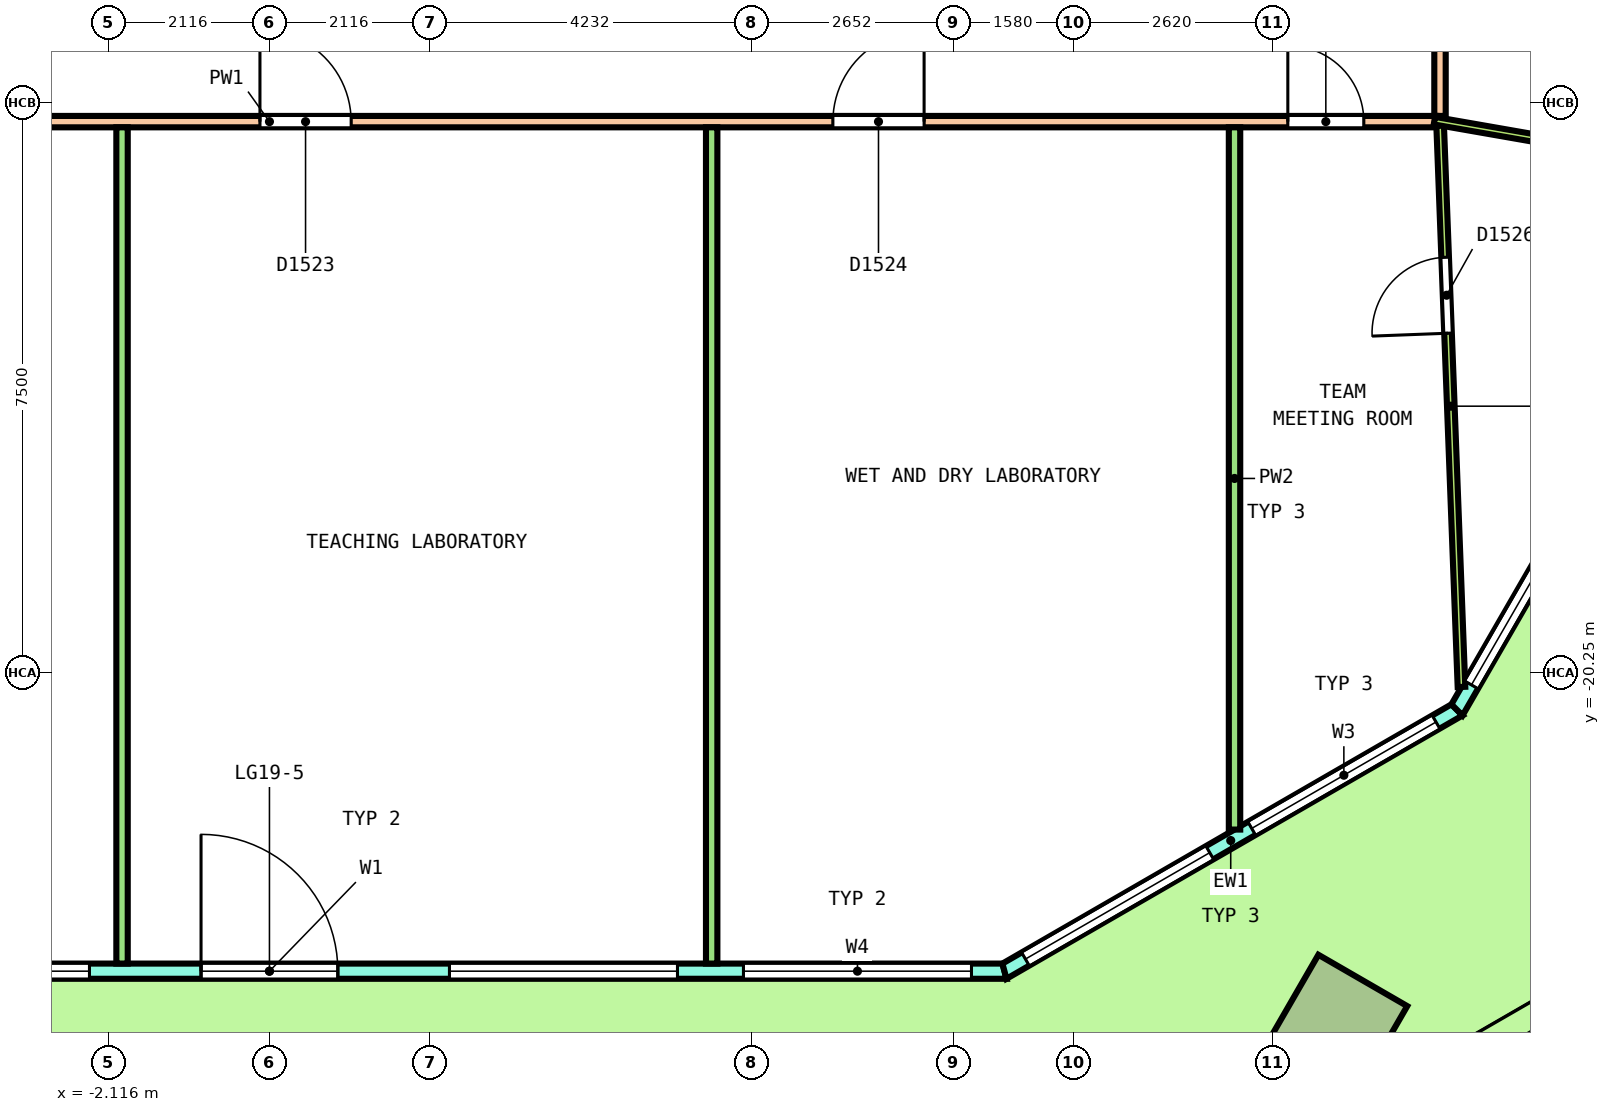
"""IFC4 building model, lengths in metres.
Left out: names, types, materials, properties, quantities, classifications, styles, units other than length and angle.
Written with IfcOpenShell. Run it as: python <this file> out.ifc"""

import sys

from ifc_helpers import new_model, si_unit, direction, frame, frame_2d, origin, origin_2d, place, context, subcontext, project, spatial, polyline, rectangle, outline, extrude, element, fill, save


model = new_model("IFC4")
c1 = context("Model", 3, precision=1e-05, world=origin(), true_north=direction((0.0, 1.0)))
c2 = subcontext(c1, "Body", "Model", "MODEL_VIEW")
j1 = project(units=[si_unit("LENGTHUNIT", "METRE"), si_unit("PLANEANGLEUNIT", "RADIAN")], contexts=[c1])
p1 = place(None, origin())
s1 = spatial("IfcSite", under=j1, at=p1, CompositionType="ELEMENT")
p2 = place(p1, origin())
s2 = spatial("IfcBuilding", under=s1, at=p2, CompositionType="ELEMENT")
p3 = place(p2, frame((0.0, 0.0, 89.6)))
s3 = spatial("IfcBuildingStorey", under=s2, at=p3, CompositionType="ELEMENT", Elevation=89.6)
p4 = place(p3, frame((14.047, -24.883, 0.0), z_axis=(-0.018133721723, -0.031387604711, 0.999342777233), x_axis=(0.86599921333, 0.499059227482, 0.031388691869)))
e1 = element("IfcColumn", 1, at=p4, inside=s3, PredefinedType="COLUMN", context=c2, shape_type="SweptSolid", body=[
    extrude(rectangle(XDim=1.35, YDim=1.35, at=origin_2d()), origin(), (0.0, 0.0, 1.0), 4.052),
])
p5 = place(p3, frame((-9.67, -24.177, 0.0), z_axis=(0.0, 0.0, 1.0), x_axis=(1.0, 0.0, 0.0)))
e2 = element("IfcWall", 2, at=p5, inside=s3, PredefinedType="SOLIDWALL", context=c2, shape_type="SweptSolid", body=[
    extrude(outline(polyline([(-0.027, -0.1), (0.994, -0.1), (2.015, -0.1), (3.035, -0.1), (4.056, -0.1), (5.077, -0.1), (6.097, -0.1), (7.118, -0.1), (8.139, -0.1), (9.16, -0.1), (10.18, -0.1), (11.201, -0.1), (12.222, -0.1), (13.242, -0.1), (14.263, -0.1), (15.284, -0.1), (16.304, -0.1), (17.325, -0.1), (18.346, -0.1), (19.367, -0.1), (19.313, 0.1), (18.298, 0.1), (17.283, 0.1), (16.268, 0.1), (15.253, 0.1), (14.238, 0.1), (13.223, 0.1), (12.208, 0.1), (11.193, 0.1), (10.177, 0.1), (9.162, 0.1), (8.147, 0.1), (7.132, 0.1), (6.117, 0.1), (5.102, 0.1), (4.087, 0.1), (3.072, 0.1), (2.057, 0.1), (1.042, 0.1), (0.027, 0.1), (-0.027, -0.1)])), origin(), (0.0, 0.0, 1.0), 4.1),
])
p6 = place(p5, frame((0.434, 0.0, 0.1)))
e3 = element("IfcOpeningElement", 3, at=p6, cuts=e2, PredefinedType="OPENING", context=c2, shape_type="SweptSolid", body=[
    extrude(rectangle(XDim=3.0, YDim=2.9, at=frame_2d((1.5, 1.45))), frame((0.0, 0.11, 0.0), z_axis=(0.0, -1.0, 0.0), x_axis=(1.0, 0.0, 0.0)), (0.0, 0.0, 1.0), 0.22),
])
p7 = place(p5, frame((4.302, 0.0, 0.1)))
e4 = element("IfcOpeningElement", 4, at=p7, cuts=e2, PredefinedType="OPENING", context=c2, shape_type="SweptSolid", body=[
    extrude(rectangle(XDim=3.0, YDim=2.9, at=frame_2d((1.5, 1.45))), frame((0.0, 0.11, 0.0), z_axis=(0.0, -1.0, 0.0), x_axis=(1.0, 0.0, 0.0)), (0.0, 0.0, 1.0), 0.22),
])
p8 = place(p5, frame((8.77, 0.0, 0.0)))
e5 = element("IfcOpeningElement", 5, at=p8, cuts=e2, PredefinedType="OPENING", context=c2, shape_type="SweptSolid", body=[
    extrude(rectangle(XDim=1.8, YDim=2.4, at=frame_2d((0.9, 1.2))), frame((0.0, 0.11, 0.0), z_axis=(0.0, -1.0, 0.0), x_axis=(1.0, 0.0, 0.0)), (0.0, 0.0, 1.0), 0.22),
])
p9 = place(p5, frame((8.77, 0.0, 2.55)))
e6 = element("IfcOpeningElement", 6, at=p9, cuts=e2, PredefinedType="OPENING", context=c2, shape_type="SweptSolid", body=[
    extrude(rectangle(XDim=1.8, YDim=0.45, at=frame_2d((0.9, 0.225))), frame((0.0, 0.11, 0.0), z_axis=(0.0, -1.0, 0.0), x_axis=(1.0, 0.0, 0.0)), (0.0, 0.0, 1.0), 0.22),
])
p10 = place(p5, frame((12.038, 0.0, 0.1)))
e7 = element("IfcOpeningElement", 7, at=p10, cuts=e2, PredefinedType="OPENING", context=c2, shape_type="SweptSolid", body=[
    extrude(rectangle(XDim=3.0, YDim=2.9, at=frame_2d((1.5, 1.45))), frame((0.0, 0.11, 0.0), z_axis=(0.0, -1.0, 0.0), x_axis=(1.0, 0.0, 0.0)), (0.0, 0.0, 1.0), 0.22),
])
p11 = place(p5, frame((15.906, 0.0, 0.1)))
e8 = element("IfcOpeningElement", 8, at=p11, cuts=e2, PredefinedType="OPENING", context=c2, shape_type="SweptSolid", body=[
    extrude(rectangle(XDim=3.0, YDim=2.9, at=frame_2d((1.5, 1.45))), frame((0.0, 0.11, 0.0), z_axis=(0.0, -1.0, 0.0), x_axis=(1.0, 0.0, 0.0)), (0.0, 0.0, 1.0), 0.22),
])
p12 = place(p3, frame((9.67, -24.177, 0.0), z_axis=(0.0, 0.0, 1.0), x_axis=(0.866029458321, 0.49999297727, 0.0)))
e9 = element("IfcWall", 9, at=p12, inside=s3, PredefinedType="SOLIDWALL", context=c2, shape_type="SweptSolid", body=[
    extrude(outline(polyline([(-0.027, -0.1), (1.128, -0.1), (2.282, -0.1), (3.437, -0.1), (4.592, -0.1), (5.747, -0.1), (6.901, -0.1), (6.848, 0.1), (5.711, 0.1), (4.574, 0.1), (3.437, 0.1), (2.301, 0.1), (1.164, 0.1), (0.027, 0.1), (-0.027, -0.1)])), origin(), (0.0, 0.0, 1.0), 4.1),
])
p13 = place(p12, frame((0.319, 0.0, 0.1)))
e10 = element("IfcOpeningElement", 10, at=p13, cuts=e9, PredefinedType="OPENING", context=c2, shape_type="SweptSolid", body=[
    extrude(rectangle(XDim=2.8, YDim=2.9, at=frame_2d((1.4, 1.45))), frame((0.0, 0.11, 0.0), z_axis=(0.0, -1.0, 0.0), x_axis=(1.0, 0.0, 0.0)), (0.0, 0.0, 1.0), 0.22),
])
p14 = place(p12, frame((3.756, 0.0, 0.1)))
e11 = element("IfcOpeningElement", 11, at=p14, cuts=e9, PredefinedType="OPENING", context=c2, shape_type="SweptSolid", body=[
    extrude(rectangle(XDim=2.8, YDim=2.9, at=frame_2d((1.4, 1.45))), frame((0.0, 0.11, 0.0), z_axis=(0.0, -1.0, 0.0), x_axis=(1.0, 0.0, 0.0)), (0.0, 0.0, 1.0), 0.22),
])
p15 = place(p3, frame((15.624, -20.739, 0.0), z_axis=(0.0, 0.0, 1.0), x_axis=(0.500001833672, 0.866024345111, 0.0)))
e12 = element("IfcWall", 12, at=p15, inside=s3, PredefinedType="SOLIDWALL", context=c2, shape_type="SweptSolid", body=[
    extrude(outline(polyline([(-0.027, -0.1), (0.991, -0.1), (2.008, -0.1), (3.026, -0.1), (4.043, -0.1), (5.061, -0.1), (6.079, -0.1), (7.096, -0.1), (8.114, -0.1), (9.131, -0.1), (10.149, -0.1), (11.167, -0.1), (12.184, -0.1), (13.202, -0.1), (14.219, -0.1), (15.237, -0.1), (16.254, -0.1), (17.272, -0.1), (18.29, -0.1), (19.307, -0.1), (20.325, -0.1), (20.271, 0.1), (19.259, 0.1), (18.247, 0.1), (17.234, 0.1), (16.222, 0.1), (15.21, 0.1), (14.198, 0.1), (13.186, 0.1), (12.173, 0.1), (11.161, 0.1), (10.149, 0.1), (9.137, 0.1), (8.125, 0.1), (7.112, 0.1), (6.1, 0.1), (5.088, 0.1), (4.076, 0.1), (3.063, 0.1), (2.051, 0.1), (1.039, 0.1), (0.027, 0.1), (-0.027, -0.1)])), origin(), (0.0, 0.0, 1.0), 4.1),
])
p16 = place(p15, frame((0.38, 0.0, 0.1)))
e13 = element("IfcOpeningElement", 13, at=p16, cuts=e12, PredefinedType="OPENING", context=c2, shape_type="SweptSolid", body=[
    extrude(rectangle(XDim=3.3, YDim=2.9, at=frame_2d((1.65, 1.45))), frame((0.0, 0.11, 0.0), z_axis=(0.0, -1.0, 0.0), x_axis=(1.0, 0.0, 0.0)), (0.0, 0.0, 1.0), 0.22),
])
p17 = place(p15, frame((4.439, 0.0, 0.1)))
e14 = element("IfcOpeningElement", 14, at=p17, cuts=e12, PredefinedType="OPENING", context=c2, shape_type="SweptSolid", body=[
    extrude(rectangle(XDim=3.3, YDim=2.9, at=frame_2d((1.65, 1.45))), frame((0.0, 0.11, 0.0), z_axis=(0.0, -1.0, 0.0), x_axis=(1.0, 0.0, 0.0)), (0.0, 0.0, 1.0), 0.22),
])
p18 = place(p15, frame((9.249, 0.0, 0.0)))
e15 = element("IfcOpeningElement", 15, at=p18, cuts=e12, PredefinedType="OPENING", context=c2, shape_type="SweptSolid", body=[
    extrude(rectangle(XDim=1.8, YDim=2.4, at=frame_2d((0.9, 1.2))), frame((0.0, 0.11, 0.0), z_axis=(0.0, -1.0, 0.0), x_axis=(1.0, 0.0, 0.0)), (0.0, 0.0, 1.0), 0.22),
])
p19 = place(p15, frame((9.249, 0.0, 2.55)))
e16 = element("IfcOpeningElement", 16, at=p19, cuts=e12, PredefinedType="OPENING", context=c2, shape_type="SweptSolid", body=[
    extrude(rectangle(XDim=1.8, YDim=0.45, at=frame_2d((0.9, 0.225))), frame((0.0, 0.11, 0.0), z_axis=(0.0, -1.0, 0.0), x_axis=(1.0, 0.0, 0.0)), (0.0, 0.0, 1.0), 0.22),
])
p20 = place(p15, frame((12.559, 0.0, 0.1)))
e17 = element("IfcOpeningElement", 17, at=p20, cuts=e12, PredefinedType="OPENING", context=c2, shape_type="SweptSolid", body=[
    extrude(rectangle(XDim=3.3, YDim=2.9, at=frame_2d((1.65, 1.45))), frame((0.0, 0.11, 0.0), z_axis=(0.0, -1.0, 0.0), x_axis=(1.0, 0.0, 0.0)), (0.0, 0.0, 1.0), 0.22),
])
p21 = place(p15, frame((16.618, 0.0, 0.1)))
e18 = element("IfcOpeningElement", 18, at=p21, cuts=e12, PredefinedType="OPENING", context=c2, shape_type="SweptSolid", body=[
    extrude(rectangle(XDim=3.3, YDim=2.9, at=frame_2d((1.65, 1.45))), frame((0.0, 0.11, 0.0), z_axis=(0.0, -1.0, 0.0), x_axis=(1.0, 0.0, 0.0)), (0.0, 0.0, 1.0), 0.22),
])
p22 = place(p3, frame((15.4, -12.925, 0.0), z_axis=(0.0, 0.0, 1.0), x_axis=(0.0, 1.0, 0.0)))
e19 = element("IfcWall", 19, at=p22, inside=s3, PredefinedType="PARTITIONING", context=c2, shape_type="SweptSolid", body=[
    extrude(rectangle(XDim=25.85, YDim=0.15, at=frame_2d((12.925, 0.0))), origin(), (0.0, 0.0, 1.0), 3.05),
])
p23 = place(p22, frame((15.497, 0.0, 0.0)))
e20 = element("IfcOpeningElement", 20, at=p23, cuts=e19, PredefinedType="OPENING", context=c2, shape_type="SweptSolid", body=[
    extrude(rectangle(XDim=1.2, YDim=2.1, at=frame_2d((0.6, 1.05))), frame((0.0, 0.085, 0.0), z_axis=(0.0, -1.0, 0.0), x_axis=(1.0, 0.0, 0.0)), (0.0, 0.0, 1.0), 0.17),
])
p24 = place(p22, frame((22.975, 0.0, 0.0)))
e21 = element("IfcOpeningElement", 21, at=p24, cuts=e19, PredefinedType="OPENING", context=c2, shape_type="SweptSolid", body=[
    extrude(rectangle(XDim=1.2, YDim=2.1, at=frame_2d((0.6, 1.05))), frame((0.0, 0.085, 0.0), z_axis=(0.0, -1.0, 0.0), x_axis=(1.0, 0.0, 0.0)), (0.0, 0.0, 1.0), 0.17),
])
p25 = place(p22, frame((1.881, 0.0, 0.0)))
e22 = element("IfcOpeningElement", 22, at=p25, cuts=e19, PredefinedType="OPENING", context=c2, shape_type="SweptSolid", body=[
    extrude(rectangle(XDim=1.0, YDim=2.1, at=frame_2d((0.5, 1.05))), frame((0.0, 0.085, 0.0), z_axis=(0.0, -1.0, 0.0), x_axis=(1.0, 0.0, 0.0)), (0.0, 0.0, 1.0), 0.17),
])
p26 = place(p3, frame((-15.35, -13.0, 0.0), z_axis=(0.0, 0.0, 1.0), x_axis=(1.0, 0.0, 0.0)))
e23 = element("IfcWall", 23, at=p26, inside=s3, PredefinedType="PARTITIONING", context=c2, shape_type="SweptSolid", body=[
    extrude(rectangle(XDim=30.7, YDim=0.15, at=frame_2d((15.35, 0.0))), origin(), (0.0, 0.0, 1.0), 3.05),
])
p27 = place(p26, frame((2.302, 0.0, 0.0)))
e24 = element("IfcOpeningElement", 24, at=p27, cuts=e23, PredefinedType="OPENING", context=c2, shape_type="SweptSolid", body=[
    extrude(rectangle(XDim=1.0, YDim=2.1, at=frame_2d((0.5, 1.05))), frame((0.0, 0.085, 0.0), z_axis=(0.0, -1.0, 0.0), x_axis=(1.0, 0.0, 0.0)), (0.0, 0.0, 1.0), 0.17),
])
p28 = place(p26, frame((10.546, 0.0, 0.0)))
e25 = element("IfcOpeningElement", 25, at=p28, cuts=e23, PredefinedType="OPENING", context=c2, shape_type="SweptSolid", body=[
    extrude(rectangle(XDim=1.0, YDim=2.1, at=frame_2d((0.5, 1.05))), frame((0.0, 0.085, 0.0), z_axis=(0.0, -1.0, 0.0), x_axis=(1.0, 0.0, 0.0)), (0.0, 0.0, 1.0), 0.17),
])
p29 = place(p26, frame((15.225, 0.0, 0.0)))
e26 = element("IfcOpeningElement", 26, at=p29, cuts=e23, PredefinedType="OPENING", context=c2, shape_type="SweptSolid", body=[
    extrude(rectangle(XDim=1.2, YDim=2.1, at=frame_2d((0.6, 1.05))), frame((0.0, 0.085, 0.0), z_axis=(0.0, -1.0, 0.0), x_axis=(1.0, 0.0, 0.0)), (0.0, 0.0, 1.0), 0.17),
])
p30 = place(p26, frame((22.763, 0.0, 0.0)))
e27 = element("IfcOpeningElement", 27, at=p30, cuts=e23, PredefinedType="OPENING", context=c2, shape_type="SweptSolid", body=[
    extrude(rectangle(XDim=1.2, YDim=2.1, at=frame_2d((0.6, 1.05))), frame((0.0, 0.085, 0.0), z_axis=(0.0, -1.0, 0.0), x_axis=(1.0, 0.0, 0.0)), (0.0, 0.0, 1.0), 0.17),
])
p31 = place(p26, frame((28.748, 0.0, 0.0)))
e28 = element("IfcOpeningElement", 28, at=p31, cuts=e23, PredefinedType="OPENING", context=c2, shape_type="SweptSolid", body=[
    extrude(rectangle(XDim=1.0, YDim=2.1, at=frame_2d((0.5, 1.05))), frame((0.0, 0.085, 0.0), z_axis=(0.0, -1.0, 0.0), x_axis=(1.0, 0.0, 0.0)), (0.0, 0.0, 1.0), 0.17),
])
for number, where, z_axis, x_axis in (
    (29, (-1.939, -24.077, 0.0), (0.0, 0.0, 1.0), (0.0, 1.0, 0.0)),
    (30, (5.818, -24.077, 0.0), (0.0, 0.0, 1.0), (0.0, 1.0, 0.0)),
):
    element("IfcWall", number, at=place(p3, frame(where, z_axis=z_axis, x_axis=x_axis)), inside=s3, PredefinedType="PARTITIONING", context=c2, shape_type="SweptSolid", body=[
        extrude(rectangle(XDim=11.002, YDim=0.15, at=frame_2d((5.501, 0.0))), origin(), (0.0, 0.0, 1.0), 3.05),
    ])
p32 = place(p3, frame((12.697, -22.314, 0.0), z_axis=(0.0, 0.0, 1.0), x_axis=(0.0, 1.0, 0.0)))
e31 = element("IfcWall", 31, at=p32, inside=s3, PredefinedType="PARTITIONING", context=c2, shape_type="SweptSolid", body=[
    extrude(rectangle(XDim=9.239, YDim=0.15, at=frame_2d((4.619, 0.0))), origin(), (0.0, 0.0, 1.0), 3.05),
])
p33 = place(p3, frame((15.402, -13.05, 0.0), z_axis=(0.0, 0.0, 1.0), x_axis=(0.037980310701, -0.99927848771, 0.0)))
e32 = element("IfcWall", 32, at=p33, inside=s3, PredefinedType="PARTITIONING", context=c2, shape_type="SweptSolid", body=[
    extrude(rectangle(XDim=7.392, YDim=0.1, at=frame_2d((3.696, 0.0))), origin(), (0.0, 0.0, 1.0), 3.05),
])
p34 = place(p33, frame((1.736, 0.0, 0.0)))
e33 = element("IfcOpeningElement", 33, at=p34, cuts=e32, PredefinedType="OPENING", context=c2, shape_type="SweptSolid", body=[
    extrude(rectangle(XDim=1.0, YDim=2.1, at=frame_2d((0.5, 1.05))), frame((0.0, 0.06, 0.0), z_axis=(0.0, -1.0, 0.0), x_axis=(1.0, 0.0, 0.0)), (0.0, 0.0, 1.0), 0.12),
])
p35 = place(p3, frame((15.326, -12.987, 0.0), z_axis=(0.0, 0.0, 1.0), x_axis=(0.985095547781, -0.172008028135, 0.0)))
e34 = element("IfcWall", 34, at=p35, inside=s3, PredefinedType="PARTITIONING", context=c2, shape_type="SweptSolid", body=[
    extrude(rectangle(XDim=4.295, YDim=0.1, at=frame_2d((2.147, 0.0))), origin(), (0.0, 0.0, 1.0), 3.05),
])
p36 = place(p7, origin())
e35 = element("IfcWindow", 35, at=p36, inside=s3, PartitioningType="SINGLE_PANEL", PredefinedType="WINDOW", context=c2, shape_type="SweptSolid", body=[
    extrude(rectangle(XDim=3.0, YDim=2.9, at=frame_2d((1.5, 1.45))), frame((0.0, 0.03, 0.0), z_axis=(0.0, -1.0, 0.0), x_axis=(1.0, 0.0, 0.0)), (0.0, 0.0, 1.0), 0.06),
])
fill(e4, e35)
p37 = place(p8, origin())
e36 = element("IfcDoor", 36, at=p37, inside=s3, OperationType="DOUBLE_DOOR_SINGLE_SWING", PredefinedType="DOOR", context=c2, shape_type="SweptSolid", body=[
    extrude(rectangle(XDim=1.8, YDim=2.4, at=frame_2d((0.9, 1.2))), frame((0.0, 0.025, 0.0), z_axis=(0.0, -1.0, 0.0), x_axis=(1.0, 0.0, 0.0)), (0.0, 0.0, 1.0), 0.05),
])
fill(e5, e36)
p38 = place(p9, origin())
e37 = element("IfcWindow", 37, at=p38, inside=s3, PartitioningType="SINGLE_PANEL", PredefinedType="WINDOW", context=c2, shape_type="SweptSolid", body=[
    extrude(rectangle(XDim=1.8, YDim=0.45, at=frame_2d((0.9, 0.225))), frame((0.0, 0.03, 0.0), z_axis=(0.0, -1.0, 0.0), x_axis=(1.0, 0.0, 0.0)), (0.0, 0.0, 1.0), 0.06),
])
fill(e6, e37)
p39 = place(p10, origin())
e38 = element("IfcWindow", 38, at=p39, inside=s3, PartitioningType="SINGLE_PANEL", PredefinedType="WINDOW", context=c2, shape_type="SweptSolid", body=[
    extrude(rectangle(XDim=3.0, YDim=2.9, at=frame_2d((1.5, 1.45))), frame((0.0, 0.03, 0.0), z_axis=(0.0, -1.0, 0.0), x_axis=(1.0, 0.0, 0.0)), (0.0, 0.0, 1.0), 0.06),
])
fill(e7, e38)
p40 = place(p11, origin())
e39 = element("IfcWindow", 39, at=p40, inside=s3, PartitioningType="SINGLE_PANEL", PredefinedType="WINDOW", context=c2, shape_type="SweptSolid", body=[
    extrude(rectangle(XDim=3.0, YDim=2.9, at=frame_2d((1.5, 1.45))), frame((0.0, 0.03, 0.0), z_axis=(0.0, -1.0, 0.0), x_axis=(1.0, 0.0, 0.0)), (0.0, 0.0, 1.0), 0.06),
])
fill(e8, e39)
p41 = place(p13, origin())
e40 = element("IfcWindow", 40, at=p41, inside=s3, PartitioningType="SINGLE_PANEL", PredefinedType="WINDOW", context=c2, shape_type="SweptSolid", body=[
    extrude(rectangle(XDim=2.8, YDim=2.9, at=frame_2d((1.4, 1.45))), frame((0.0, 0.03, 0.0), z_axis=(0.0, -1.0, 0.0), x_axis=(1.0, 0.0, 0.0)), (0.0, 0.0, 1.0), 0.06),
])
fill(e10, e40)
p42 = place(p14, origin())
e41 = element("IfcWindow", 41, at=p42, inside=s3, PartitioningType="SINGLE_PANEL", PredefinedType="WINDOW", context=c2, shape_type="SweptSolid", body=[
    extrude(rectangle(XDim=2.8, YDim=2.9, at=frame_2d((1.4, 1.45))), frame((0.0, 0.03, 0.0), z_axis=(0.0, -1.0, 0.0), x_axis=(1.0, 0.0, 0.0)), (0.0, 0.0, 1.0), 0.06),
])
fill(e11, e41)
p43 = place(p16, origin())
e42 = element("IfcWindow", 42, at=p43, inside=s3, PartitioningType="SINGLE_PANEL", PredefinedType="WINDOW", context=c2, shape_type="SweptSolid", body=[
    extrude(rectangle(XDim=3.3, YDim=2.9, at=frame_2d((1.65, 1.45))), frame((0.0, 0.03, 0.0), z_axis=(0.0, -1.0, 0.0), x_axis=(1.0, 0.0, 0.0)), (0.0, 0.0, 1.0), 0.06),
])
fill(e13, e42)
p44 = place(p29, origin())
e43 = element("IfcDoor", 43, at=p44, inside=s3, OperationType="DOUBLE_DOOR_SINGLE_SWING", PredefinedType="DOOR", context=c2, shape_type="SweptSolid", body=[
    extrude(rectangle(XDim=1.2, YDim=2.1, at=frame_2d((0.6, 1.05))), frame((0.0, 0.025, 0.0), z_axis=(0.0, -1.0, 0.0), x_axis=(1.0, 0.0, 0.0)), (0.0, 0.0, 1.0), 0.05),
])
fill(e26, e43)
p45 = place(p30, origin())
e44 = element("IfcDoor", 44, at=p45, inside=s3, OperationType="DOUBLE_DOOR_SINGLE_SWING", PredefinedType="DOOR", context=c2, shape_type="SweptSolid", body=[
    extrude(rectangle(XDim=1.2, YDim=2.1, at=frame_2d((0.6, 1.05))), frame((0.0, 0.025, 0.0), z_axis=(0.0, -1.0, 0.0), x_axis=(1.0, 0.0, 0.0)), (0.0, 0.0, 1.0), 0.05),
])
fill(e27, e44)
p46 = place(p31, origin())
e45 = element("IfcDoor", 45, at=p46, inside=s3, OperationType="SINGLE_SWING_RIGHT", PredefinedType="DOOR", context=c2, shape_type="SweptSolid", body=[
    extrude(rectangle(XDim=1.0, YDim=2.1, at=frame_2d((0.5, 1.05))), frame((0.0, 0.025, 0.0), z_axis=(0.0, -1.0, 0.0), x_axis=(1.0, 0.0, 0.0)), (0.0, 0.0, 1.0), 0.05),
])
fill(e28, e45)
p47 = place(p34, origin())
e46 = element("IfcDoor", 46, at=p47, inside=s3, OperationType="SINGLE_SWING_RIGHT", PredefinedType="DOOR", context=c2, shape_type="SweptSolid", body=[
    extrude(rectangle(XDim=1.0, YDim=2.1, at=frame_2d((0.5, 1.05))), frame((0.0, 0.025, 0.0), z_axis=(0.0, -1.0, 0.0), x_axis=(1.0, 0.0, 0.0)), (0.0, 0.0, 1.0), 0.05),
])
fill(e33, e46)
save(model, sys.argv[1])
